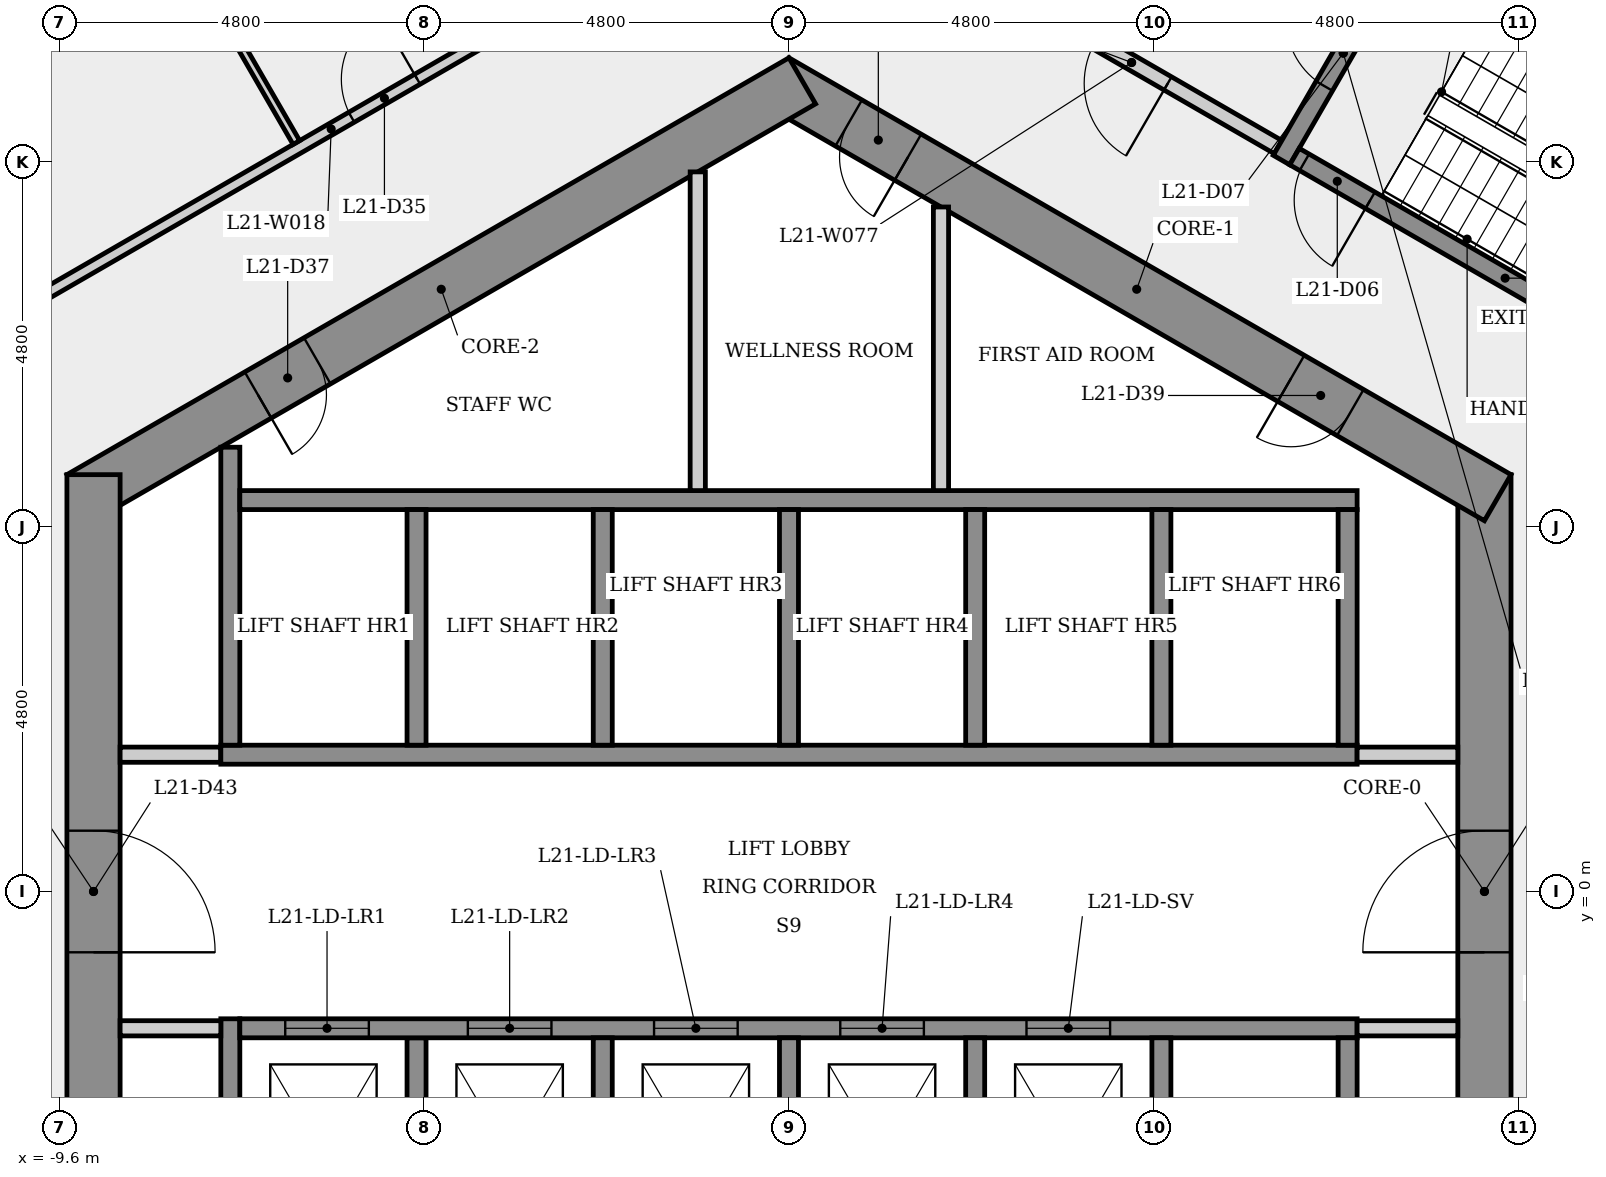
"""IFC4 building model, lengths in metres.
Left out: names, types, materials, properties, quantities, classifications, styles, units other than length and angle.
Written with IfcOpenShell. Run it as: python <this file> out.ifc"""

import sys

from ifc_helpers import new_model, si_unit, direction, frame, frame_2d, origin, place, context, subcontext, project, spatial, rectangle, extrude, element, fill, save


model = new_model("IFC4")
c1 = context("Model", 3, precision=1e-05, world=origin(), true_north=direction((0.0, 1.0)))
c2 = subcontext(c1, "Body", "Model", "MODEL_VIEW")
j1 = project(units=[si_unit("LENGTHUNIT", "METRE"), si_unit("PLANEANGLEUNIT", "RADIAN")], contexts=[c1])
p1 = place(None, origin())
s1 = spatial("IfcSite", under=j1, at=p1, CompositionType="ELEMENT")
p2 = place(p1, origin())
s2 = spatial("IfcBuilding", under=s1, at=p2, CompositionType="ELEMENT")
p3 = place(p2, frame((0.0, 0.0, 83.1)))
s3 = spatial("IfcBuildingStorey", under=s2, at=p3, CompositionType="ELEMENT", Elevation=83.1)
p4 = place(p3, frame((9.15, -5.485, 0.0), z_axis=(0.0, 0.0, 1.0), x_axis=(0.0, 1.0, 0.0)))
e1 = element("IfcWall", 1, at=p4, inside=s3, PredefinedType="SHEAR", context=c2, shape_type="SweptSolid", body=[
    extrude(rectangle(XDim=10.97, YDim=0.7, at=frame_2d((5.485, 0.0))), origin(), (0.0, 0.0, 1.0), 3.4),
])
p5 = place(p4, frame((4.685, 0.0, 0.0)))
e2 = element("IfcOpeningElement", 2, at=p5, cuts=e1, PredefinedType="OPENING", context=c2, shape_type="SweptSolid", body=[
    extrude(rectangle(XDim=1.6, YDim=2.1, at=frame_2d((0.8, 1.05))), frame((0.0, 0.36, 0.0), z_axis=(0.0, -1.0, 0.0), x_axis=(1.0, 0.0, 0.0)), (0.0, 0.0, 1.0), 0.72),
])
p6 = place(p3, frame((9.325, 5.182, 0.0), z_axis=(0.0, 0.0, 1.0), x_axis=(-0.866023993627, 0.500002442456, 0.0)))
e3 = element("IfcWall", 3, at=p6, inside=s3, PredefinedType="SHEAR", context=c2, shape_type="SweptSolid", body=[
    extrude(rectangle(XDim=10.97, YDim=0.7, at=frame_2d((5.485, 0.0))), origin(), (0.0, 0.0, 1.0), 3.4),
])
p7 = place(p6, frame((8.96, 0.0, 0.0)))
e4 = element("IfcOpeningElement", 4, at=p7, cuts=e3, PredefinedType="OPENING", context=c2, shape_type="SweptSolid", body=[
    extrude(rectangle(XDim=0.9, YDim=2.1, at=frame_2d((0.45, 1.05))), frame((0.0, 0.36, 0.0), z_axis=(0.0, -1.0, 0.0), x_axis=(1.0, 0.0, 0.0)), (0.0, 0.0, 1.0), 0.72),
])
p8 = place(p6, frame((2.24, 0.0, 0.0)))
e5 = element("IfcOpeningElement", 5, at=p8, cuts=e3, PredefinedType="OPENING", context=c2, shape_type="SweptSolid", body=[
    extrude(rectangle(XDim=0.9, YDim=2.1, at=frame_2d((0.45, 1.05))), frame((0.0, 0.36, 0.0), z_axis=(0.0, -1.0, 0.0), x_axis=(1.0, 0.0, 0.0)), (0.0, 0.0, 1.0), 0.72),
])
p9 = place(p3, frame((0.175, 10.667, 0.0), z_axis=(0.0, 0.0, 1.0), x_axis=(-0.866023993627, -0.500002442456, 0.0)))
e6 = element("IfcWall", 6, at=p9, inside=s3, PredefinedType="SHEAR", context=c2, shape_type="SweptSolid", body=[
    extrude(rectangle(XDim=10.97, YDim=0.7, at=frame_2d((5.485, 0.0))), origin(), (0.0, 0.0, 1.0), 3.4),
])
p10 = place(p9, frame((7.368, 0.0, 0.0)))
e7 = element("IfcOpeningElement", 7, at=p10, cuts=e6, PredefinedType="OPENING", context=c2, shape_type="SweptSolid", body=[
    extrude(rectangle(XDim=0.9, YDim=2.1, at=frame_2d((0.45, 1.05))), frame((0.0, 0.36, 0.0), z_axis=(0.0, -1.0, 0.0), x_axis=(1.0, 0.0, 0.0)), (0.0, 0.0, 1.0), 0.72),
])
p11 = place(p3, frame((-9.15, 5.485, 0.0), z_axis=(0.0, 0.0, 1.0), x_axis=(0.0, -1.0, 0.0)))
e8 = element("IfcWall", 8, at=p11, inside=s3, PredefinedType="SHEAR", context=c2, shape_type="SweptSolid", body=[
    extrude(rectangle(XDim=10.97, YDim=0.7, at=frame_2d((5.485, 0.0))), origin(), (0.0, 0.0, 1.0), 3.4),
])
p12 = place(p11, frame((4.685, 0.0, 0.0)))
e9 = element("IfcOpeningElement", 9, at=p12, cuts=e8, PredefinedType="OPENING", context=c2, shape_type="SweptSolid", body=[
    extrude(rectangle(XDim=1.6, YDim=2.1, at=frame_2d((0.8, 1.05))), frame((0.0, 0.36, 0.0), z_axis=(0.0, -1.0, 0.0), x_axis=(1.0, 0.0, 0.0)), (0.0, 0.0, 1.0), 0.72),
])
p13 = place(p3, frame((-10.731, 7.315, 0.0), z_axis=(0.0, 0.0, 1.0), x_axis=(0.866024779313, 0.500001081615, 0.0)))
e10 = element("IfcWall", 10, at=p13, inside=s3, PredefinedType="PARTITIONING", context=c2, shape_type="SweptSolid", body=[
    extrude(rectangle(XDim=10.872, YDim=0.15, at=frame_2d((5.436, 0.0))), origin(), (0.0, 0.0, 1.0), 3.05),
])
p14 = place(p13, frame((5.745, 0.0, 0.0)))
e11 = element("IfcOpeningElement", 11, at=p14, cuts=e10, PredefinedType="OPENING", context=c2, shape_type="SweptSolid", body=[
    extrude(rectangle(XDim=1.0, YDim=2.1, at=frame_2d((0.5, 1.05))), frame((0.0, 0.085, 0.0), z_axis=(0.0, -1.0, 0.0), x_axis=(1.0, 0.0, 0.0)), (0.0, 0.0, 1.0), 0.17),
])
p15 = place(p3, frame((-8.8, 1.8, 0.0), z_axis=(0.0, 0.0, 1.0), x_axis=(1.0, 0.0, 0.0)))
e12 = element("IfcWall", 12, at=p15, inside=s3, PredefinedType="PARTITIONING", context=c2, shape_type="SweptSolid", body=[
    extrude(rectangle(XDim=1.325, YDim=0.2, at=frame_2d((0.663, 0.0))), origin(), (0.0, 0.0, 1.0), 3.05),
])
p16 = place(p3, frame((-7.475, 1.8, 0.0), z_axis=(0.0, 0.0, 1.0), x_axis=(1.0, 0.0, 0.0)))
e13 = element("IfcWall", 13, at=p16, inside=s3, PredefinedType="SHEAR", context=c2, shape_type="SweptSolid", body=[
    extrude(rectangle(XDim=14.95, YDim=0.25, at=frame_2d((7.475, 0.0))), origin(), (0.0, 0.0, 1.0), 3.05),
])
p17 = place(p3, frame((-7.35, -5.846, 0.0), z_axis=(0.0, 0.0, 1.0), x_axis=(0.0, 1.0, 0.0)))
e14 = element("IfcWall", 14, at=p17, inside=s3, PredefinedType="SHEAR", context=c2, shape_type="SweptSolid", body=[
    extrude(rectangle(XDim=4.171, YDim=0.25, at=frame_2d((2.085, 0.0))), origin(), (0.0, 0.0, 1.0), 3.05),
])
p18 = place(p3, frame((-7.35, 1.925, 0.0), z_axis=(0.0, 0.0, 1.0), x_axis=(0.0, 1.0, 0.0)))
e15 = element("IfcWall", 15, at=p18, inside=s3, PredefinedType="SHEAR", context=c2, shape_type="SweptSolid", body=[
    extrude(rectangle(XDim=3.921, YDim=0.25, at=frame_2d((1.96, 0.0))), origin(), (0.0, 0.0, 1.0), 3.05),
])
p19 = place(p3, frame((-7.225, 5.15, 0.0), z_axis=(0.0, 0.0, 1.0), x_axis=(1.0, 0.0, 0.0)))
e16 = element("IfcWall", 16, at=p19, inside=s3, PredefinedType="SHEAR", context=c2, shape_type="SweptSolid", body=[
    extrude(rectangle(XDim=14.7, YDim=0.25, at=frame_2d((7.35, 0.0))), origin(), (0.0, 0.0, 1.0), 3.05),
])
p20 = place(p3, frame((-7.475, -1.8, 0.0), z_axis=(0.0, 0.0, 1.0), x_axis=(-1.0, 0.0, 0.0)))
e17 = element("IfcWall", 17, at=p20, inside=s3, PredefinedType="PARTITIONING", context=c2, shape_type="SweptSolid", body=[
    extrude(rectangle(XDim=1.325, YDim=0.2, at=frame_2d((0.663, 0.0))), origin(), (0.0, 0.0, 1.0), 3.05),
])
p21 = place(p3, frame((-6.481, 9.855, 0.0), z_axis=(0.0, 0.0, 1.0), x_axis=(-0.499986033803, 0.866033467022, 0.0)))
e18 = element("IfcWall", 18, at=p21, inside=s3, PredefinedType="PARTITIONING", context=c2, shape_type="SweptSolid", body=[
    extrude(rectangle(XDim=8.232, YDim=0.1, at=frame_2d((4.116, 0.0))), origin(), (0.0, 0.0, 1.0), 3.05),
])
for number, where, z_axis, x_axis in (
    (19, (-4.9, -1.925, 0.0), (0.0, 0.0, 1.0), (0.0, -1.0, 0.0)),
    (20, (-4.9, 5.025, 0.0), (0.0, 0.0, 1.0), (0.0, -1.0, 0.0)),
):
    element("IfcWall", number, at=place(p3, frame(where, z_axis=z_axis, x_axis=x_axis)), inside=s3, PredefinedType="SHEAR", context=c2, shape_type="SweptSolid", body=[
        extrude(rectangle(XDim=3.1, YDim=0.25, at=frame_2d((1.55, 0.0))), origin(), (0.0, 0.0, 1.0), 3.4),
    ])
p22 = place(p3, frame((-7.225, -1.8, 0.0), z_axis=(0.0, 0.0, 1.0), x_axis=(1.0, 0.0, 0.0)))
e21 = element("IfcWall", 21, at=p22, inside=s3, PredefinedType="SHEAR", context=c2, shape_type="SweptSolid", body=[
    extrude(rectangle(XDim=14.7, YDim=0.25, at=frame_2d((7.35, 0.0))), origin(), (0.0, 0.0, 1.0), 3.05),
])
p23 = place(p22, frame((0.597, 0.0, 0.0)))
e22 = element("IfcOpeningElement", 22, at=p23, cuts=e21, PredefinedType="OPENING", context=c2, shape_type="SweptSolid", body=[
    extrude(rectangle(XDim=1.1, YDim=2.1, at=frame_2d((0.55, 1.05))), frame((0.0, 0.135, 0.0), z_axis=(0.0, -1.0, 0.0), x_axis=(1.0, 0.0, 0.0)), (0.0, 0.0, 1.0), 0.27),
])
p24 = place(p22, frame((3.0, 0.0, 0.0)))
e23 = element("IfcOpeningElement", 23, at=p24, cuts=e21, PredefinedType="OPENING", context=c2, shape_type="SweptSolid", body=[
    extrude(rectangle(XDim=1.1, YDim=2.1, at=frame_2d((0.55, 1.05))), frame((0.0, 0.135, 0.0), z_axis=(0.0, -1.0, 0.0), x_axis=(1.0, 0.0, 0.0)), (0.0, 0.0, 1.0), 0.27),
])
p25 = place(p22, frame((5.45, 0.0, 0.0)))
e24 = element("IfcOpeningElement", 24, at=p25, cuts=e21, PredefinedType="OPENING", context=c2, shape_type="SweptSolid", body=[
    extrude(rectangle(XDim=1.1, YDim=2.1, at=frame_2d((0.55, 1.05))), frame((0.0, 0.135, 0.0), z_axis=(0.0, -1.0, 0.0), x_axis=(1.0, 0.0, 0.0)), (0.0, 0.0, 1.0), 0.27),
])
p26 = place(p22, frame((7.9, 0.0, 0.0)))
e25 = element("IfcOpeningElement", 25, at=p26, cuts=e21, PredefinedType="OPENING", context=c2, shape_type="SweptSolid", body=[
    extrude(rectangle(XDim=1.1, YDim=2.1, at=frame_2d((0.55, 1.05))), frame((0.0, 0.135, 0.0), z_axis=(0.0, -1.0, 0.0), x_axis=(1.0, 0.0, 0.0)), (0.0, 0.0, 1.0), 0.27),
])
p27 = place(p22, frame((10.35, 0.0, 0.0)))
e26 = element("IfcOpeningElement", 26, at=p27, cuts=e21, PredefinedType="OPENING", context=c2, shape_type="SweptSolid", body=[
    extrude(rectangle(XDim=1.1, YDim=2.1, at=frame_2d((0.55, 1.05))), frame((0.0, 0.135, 0.0), z_axis=(0.0, -1.0, 0.0), x_axis=(1.0, 0.0, 0.0)), (0.0, 0.0, 1.0), 0.27),
])
for number, where, z_axis, x_axis in (
    (27, (-2.45, -1.925, 0.0), (0.0, 0.0, 1.0), (0.0, -1.0, 0.0)),
    (28, (-2.45, 5.025, 0.0), (0.0, 0.0, 1.0), (0.0, -1.0, 0.0)),
):
    element("IfcWall", number, at=place(p3, frame(where, z_axis=z_axis, x_axis=x_axis)), inside=s3, PredefinedType="SHEAR", context=c2, shape_type="SweptSolid", body=[
        extrude(rectangle(XDim=3.1, YDim=0.25, at=frame_2d((1.55, 0.0))), origin(), (0.0, 0.0, 1.0), 3.4),
    ])
p28 = place(p3, frame((-1.2, 9.469, 0.0), z_axis=(0.0, 0.0, 1.0), x_axis=(0.0, -1.0, 0.0)))
e29 = element("IfcWall", 29, at=p28, inside=s3, PredefinedType="PARTITIONING", context=c2, shape_type="SweptSolid", body=[
    extrude(rectangle(XDim=4.194, YDim=0.2, at=frame_2d((2.097, 0.0))), origin(), (0.0, 0.0, 1.0), 3.05),
])
for number, where, z_axis, x_axis in (
    (30, (0.0, -1.925, 0.0), (0.0, 0.0, 1.0), (0.0, -1.0, 0.0)),
    (31, (0.0, 5.025, 0.0), (0.0, 0.0, 1.0), (0.0, -1.0, 0.0)),
):
    element("IfcWall", number, at=place(p3, frame(where, z_axis=z_axis, x_axis=x_axis)), inside=s3, PredefinedType="SHEAR", context=c2, shape_type="SweptSolid", body=[
        extrude(rectangle(XDim=3.1, YDim=0.25, at=frame_2d((1.55, 0.0))), origin(), (0.0, 0.0, 1.0), 3.4),
    ])
p29 = place(p3, frame((2.0, 9.007, 0.0), z_axis=(0.0, 0.0, 1.0), x_axis=(0.0, -1.0, 0.0)))
e32 = element("IfcWall", 32, at=p29, inside=s3, PredefinedType="PARTITIONING", context=c2, shape_type="SweptSolid", body=[
    extrude(rectangle(XDim=3.732, YDim=0.2, at=frame_2d((1.866, 0.0))), origin(), (0.0, 0.0, 1.0), 3.05),
])
for number, where, z_axis, x_axis in (
    (33, (2.45, -1.925, 0.0), (0.0, 0.0, 1.0), (0.0, -1.0, 0.0)),
    (34, (2.45, 5.025, 0.0), (0.0, 0.0, 1.0), (0.0, -1.0, 0.0)),
    (35, (4.9, -1.925, 0.0), (0.0, 0.0, 1.0), (0.0, -1.0, 0.0)),
    (36, (4.9, 5.025, 0.0), (0.0, 0.0, 1.0), (0.0, -1.0, 0.0)),
):
    element("IfcWall", number, at=place(p3, frame(where, z_axis=z_axis, x_axis=x_axis)), inside=s3, PredefinedType="SHEAR", context=c2, shape_type="SweptSolid", body=[
        extrude(rectangle(XDim=3.1, YDim=0.25, at=frame_2d((1.55, 0.0))), origin(), (0.0, 0.0, 1.0), 3.4),
    ])
p30 = place(p3, frame((6.435, 9.795, 0.0), z_axis=(0.0, 0.0, 1.0), x_axis=(-0.866012907634, 0.500021643343, 0.0)))
e37 = element("IfcWall", 37, at=p30, inside=s3, PredefinedType="PARTITIONING", context=c2, shape_type="SweptSolid", body=[
    extrude(rectangle(XDim=4.45, YDim=0.2, at=frame_2d((2.225, 0.0))), origin(), (0.0, 0.0, 1.0), 3.05),
])
p31 = place(p30, frame((1.675, 0.0, 0.0)))
e38 = element("IfcOpeningElement", 38, at=p31, cuts=e37, PredefinedType="OPENING", context=c2, shape_type="SweptSolid", body=[
    extrude(rectangle(XDim=1.1, YDim=2.1, at=frame_2d((0.55, 1.05))), frame((0.0, 0.11, 0.0), z_axis=(0.0, -1.0, 0.0), x_axis=(1.0, 0.0, 0.0)), (0.0, 0.0, 1.0), 0.22),
])
p32 = place(p3, frame((6.48, 9.624, 0.0), z_axis=(0.0, 0.0, 1.0), x_axis=(0.500017246033, 0.866015446554, 0.0)))
e39 = element("IfcWall", 39, at=p32, inside=s3, PredefinedType="SHEAR", context=c2, shape_type="SweptSolid", body=[
    extrude(rectangle(XDim=3.25, YDim=0.25, at=frame_2d((1.625, 0.0))), origin(), (0.0, 0.0, 1.0), 3.05),
])
p33 = place(p32, frame((1.125, 0.0, 0.0)))
e40 = element("IfcOpeningElement", 40, at=p33, cuts=e39, PredefinedType="OPENING", context=c2, shape_type="SweptSolid", body=[
    extrude(rectangle(XDim=1.0, YDim=2.1, at=frame_2d((0.5, 1.05))), frame((0.0, 0.135, 0.0), z_axis=(0.0, -1.0, 0.0), x_axis=(1.0, 0.0, 0.0)), (0.0, 0.0, 1.0), 0.27),
])
p34 = place(p3, frame((7.475, 1.8, 0.0), z_axis=(0.0, 0.0, 1.0), x_axis=(1.0, 0.0, 0.0)))
e41 = element("IfcWall", 41, at=p34, inside=s3, PredefinedType="PARTITIONING", context=c2, shape_type="SweptSolid", body=[
    extrude(rectangle(XDim=1.325, YDim=0.2, at=frame_2d((0.663, 0.0))), origin(), (0.0, 0.0, 1.0), 3.05),
])
for number, where, z_axis, x_axis in (
    (42, (7.35, -1.925, 0.0), (0.0, 0.0, 1.0), (0.0, -1.0, 0.0)),
    (43, (7.35, 5.025, 0.0), (0.0, 0.0, 1.0), (0.0, -1.0, 0.0)),
):
    element("IfcWall", number, at=place(p3, frame(where, z_axis=z_axis, x_axis=x_axis)), inside=s3, PredefinedType="SHEAR", context=c2, shape_type="SweptSolid", body=[
        extrude(rectangle(XDim=3.1, YDim=0.25, at=frame_2d((1.55, 0.0))), origin(), (0.0, 0.0, 1.0), 3.4),
    ])
p35 = place(p3, frame((8.151, 12.268, 0.0), z_axis=(0.0, 0.0, 1.0), x_axis=(0.866025499775, -0.499999833739, 0.0)))
e44 = element("IfcWall", 44, at=p35, inside=s3, PredefinedType="SHEAR", context=c2, shape_type="SweptSolid", body=[
    extrude(rectangle(XDim=6.4, YDim=0.25, at=frame_2d((3.2, 0.0))), origin(), (0.0, 0.0, 1.0), 3.05),
])
p36 = place(p3, frame((8.8, -1.8, 0.0), z_axis=(0.0, 0.0, 1.0), x_axis=(-1.0, 0.0, 0.0)))
e45 = element("IfcWall", 45, at=p36, inside=s3, PredefinedType="PARTITIONING", context=c2, shape_type="SweptSolid", body=[
    extrude(rectangle(XDim=1.325, YDim=0.2, at=frame_2d((0.663, 0.0))), origin(), (0.0, 0.0, 1.0), 3.05),
])
p37 = place(p3, frame((12.194, 6.47, 0.0), z_axis=(0.0, 0.0, 1.0), x_axis=(-0.866025499775, 0.499999833739, 0.0)))
e46 = element("IfcWall", 46, at=p37, inside=s3, PredefinedType="SHEAR", context=c2, shape_type="SweptSolid", body=[
    extrude(rectangle(XDim=6.4, YDim=0.25, at=frame_2d((3.2, 0.0))), origin(), (0.0, 0.0, 1.0), 3.05),
])
p38 = place(p37, frame((5.25, 0.0, 0.0)))
e47 = element("IfcOpeningElement", 47, at=p38, cuts=e46, PredefinedType="OPENING", context=c2, shape_type="SweptSolid", body=[
    extrude(rectangle(XDim=1.0, YDim=2.1, at=frame_2d((0.5, 1.05))), frame((0.0, 0.135, 0.0), z_axis=(0.0, -1.0, 0.0), x_axis=(1.0, 0.0, 0.0)), (0.0, 0.0, 1.0), 0.27),
])
p39 = place(p23, origin())
e48 = element("IfcDoor", 48, at=p39, inside=s3, OperationType="SLIDING_TO_LEFT", PredefinedType="DOOR", context=c2, shape_type="SweptSolid", body=[
    extrude(rectangle(XDim=1.1, YDim=2.1, at=frame_2d((0.55, 1.05))), frame((0.0, 0.025, 0.0), z_axis=(0.0, -1.0, 0.0), x_axis=(1.0, 0.0, 0.0)), (0.0, 0.0, 1.0), 0.05),
])
fill(e22, e48)
p40 = place(p24, origin())
e49 = element("IfcDoor", 49, at=p40, inside=s3, OperationType="SLIDING_TO_LEFT", PredefinedType="DOOR", context=c2, shape_type="SweptSolid", body=[
    extrude(rectangle(XDim=1.1, YDim=2.1, at=frame_2d((0.55, 1.05))), frame((0.0, 0.025, 0.0), z_axis=(0.0, -1.0, 0.0), x_axis=(1.0, 0.0, 0.0)), (0.0, 0.0, 1.0), 0.05),
])
fill(e23, e49)
p41 = place(p25, origin())
e50 = element("IfcDoor", 50, at=p41, inside=s3, OperationType="SLIDING_TO_LEFT", PredefinedType="DOOR", context=c2, shape_type="SweptSolid", body=[
    extrude(rectangle(XDim=1.1, YDim=2.1, at=frame_2d((0.55, 1.05))), frame((0.0, 0.025, 0.0), z_axis=(0.0, -1.0, 0.0), x_axis=(1.0, 0.0, 0.0)), (0.0, 0.0, 1.0), 0.05),
])
fill(e24, e50)
p42 = place(p26, origin())
e51 = element("IfcDoor", 51, at=p42, inside=s3, OperationType="SLIDING_TO_LEFT", PredefinedType="DOOR", context=c2, shape_type="SweptSolid", body=[
    extrude(rectangle(XDim=1.1, YDim=2.1, at=frame_2d((0.55, 1.05))), frame((0.0, 0.025, 0.0), z_axis=(0.0, -1.0, 0.0), x_axis=(1.0, 0.0, 0.0)), (0.0, 0.0, 1.0), 0.05),
])
fill(e25, e51)
p43 = place(p27, origin())
e52 = element("IfcDoor", 52, at=p43, inside=s3, OperationType="SLIDING_TO_LEFT", PredefinedType="DOOR", context=c2, shape_type="SweptSolid", body=[
    extrude(rectangle(XDim=1.1, YDim=2.1, at=frame_2d((0.55, 1.05))), frame((0.0, 0.025, 0.0), z_axis=(0.0, -1.0, 0.0), x_axis=(1.0, 0.0, 0.0)), (0.0, 0.0, 1.0), 0.05),
])
fill(e26, e52)
p44 = place(p38, origin())
e53 = element("IfcDoor", 53, at=p44, inside=s3, OperationType="SINGLE_SWING_LEFT", PredefinedType="DOOR", context=c2, shape_type="SweptSolid", body=[
    extrude(rectangle(XDim=1.0, YDim=2.1, at=frame_2d((0.5, 1.05))), frame((0.0, 0.025, 0.0), z_axis=(0.0, -1.0, 0.0), x_axis=(1.0, 0.0, 0.0)), (0.0, 0.0, 1.0), 0.05),
])
fill(e47, e53)
p45 = place(p33, origin())
e54 = element("IfcDoor", 54, at=p45, inside=s3, OperationType="SINGLE_SWING_RIGHT", PredefinedType="DOOR", context=c2, shape_type="SweptSolid", body=[
    extrude(rectangle(XDim=1.0, YDim=2.1, at=frame_2d((0.5, 1.05))), frame((0.0, 0.025, 0.0), z_axis=(0.0, -1.0, 0.0), x_axis=(1.0, 0.0, 0.0)), (0.0, 0.0, 1.0), 0.05),
])
fill(e40, e54)
p46 = place(p31, origin())
e55 = element("IfcDoor", 55, at=p46, inside=s3, OperationType="SINGLE_SWING_LEFT", PredefinedType="DOOR", context=c2, shape_type="SweptSolid", body=[
    extrude(rectangle(XDim=1.1, YDim=2.1, at=frame_2d((0.55, 1.05))), frame((0.0, 0.025, 0.0), z_axis=(0.0, -1.0, 0.0), x_axis=(1.0, 0.0, 0.0)), (0.0, 0.0, 1.0), 0.05),
])
fill(e38, e55)
p47 = place(p14, origin())
e56 = element("IfcDoor", 56, at=p47, inside=s3, OperationType="SINGLE_SWING_RIGHT", PredefinedType="DOOR", context=c2, shape_type="SweptSolid", body=[
    extrude(rectangle(XDim=1.0, YDim=2.1, at=frame_2d((0.5, 1.05))), frame((0.0, 0.025, 0.0), z_axis=(0.0, -1.0, 0.0), x_axis=(1.0, 0.0, 0.0)), (0.0, 0.0, 1.0), 0.05),
])
fill(e11, e56)
p48 = place(p10, origin())
e57 = element("IfcDoor", 57, at=p48, inside=s3, OperationType="SINGLE_SWING_RIGHT", PredefinedType="DOOR", context=c2, shape_type="SweptSolid", body=[
    extrude(rectangle(XDim=0.9, YDim=2.1, at=frame_2d((0.45, 1.05))), frame((0.0, 0.025, 0.0), z_axis=(0.0, -1.0, 0.0), x_axis=(1.0, 0.0, 0.0)), (0.0, 0.0, 1.0), 0.05),
])
fill(e7, e57)
p49 = place(p7, origin())
e58 = element("IfcDoor", 58, at=p49, inside=s3, OperationType="SINGLE_SWING_LEFT", PredefinedType="DOOR", context=c2, shape_type="SweptSolid", body=[
    extrude(rectangle(XDim=0.9, YDim=2.1, at=frame_2d((0.45, 1.05))), frame((0.0, 0.025, 0.0), z_axis=(0.0, -1.0, 0.0), x_axis=(1.0, 0.0, 0.0)), (0.0, 0.0, 1.0), 0.05),
])
fill(e4, e58)
p50 = place(p8, origin())
e59 = element("IfcDoor", 59, at=p50, inside=s3, OperationType="SINGLE_SWING_RIGHT", PredefinedType="DOOR", context=c2, shape_type="SweptSolid", body=[
    extrude(rectangle(XDim=0.9, YDim=2.1, at=frame_2d((0.45, 1.05))), frame((0.0, 0.025, 0.0), z_axis=(0.0, -1.0, 0.0), x_axis=(1.0, 0.0, 0.0)), (0.0, 0.0, 1.0), 0.05),
])
fill(e5, e59)
p51 = place(p5, origin())
e60 = element("IfcDoor", 60, at=p51, inside=s3, OperationType="SINGLE_SWING_LEFT", PredefinedType="DOOR", context=c2, shape_type="SweptSolid", body=[
    extrude(rectangle(XDim=1.6, YDim=2.1, at=frame_2d((0.8, 1.05))), frame((0.0, 0.025, 0.0), z_axis=(0.0, -1.0, 0.0), x_axis=(1.0, 0.0, 0.0)), (0.0, 0.0, 1.0), 0.05),
])
fill(e2, e60)
p52 = place(p12, origin())
e61 = element("IfcDoor", 61, at=p52, inside=s3, OperationType="SINGLE_SWING_RIGHT", PredefinedType="DOOR", context=c2, shape_type="SweptSolid", body=[
    extrude(rectangle(XDim=1.6, YDim=2.1, at=frame_2d((0.8, 1.05))), frame((0.0, 0.025, 0.0), z_axis=(0.0, -1.0, 0.0), x_axis=(1.0, 0.0, 0.0)), (0.0, 0.0, 1.0), 0.05),
])
fill(e9, e61)
save(model, sys.argv[1])
